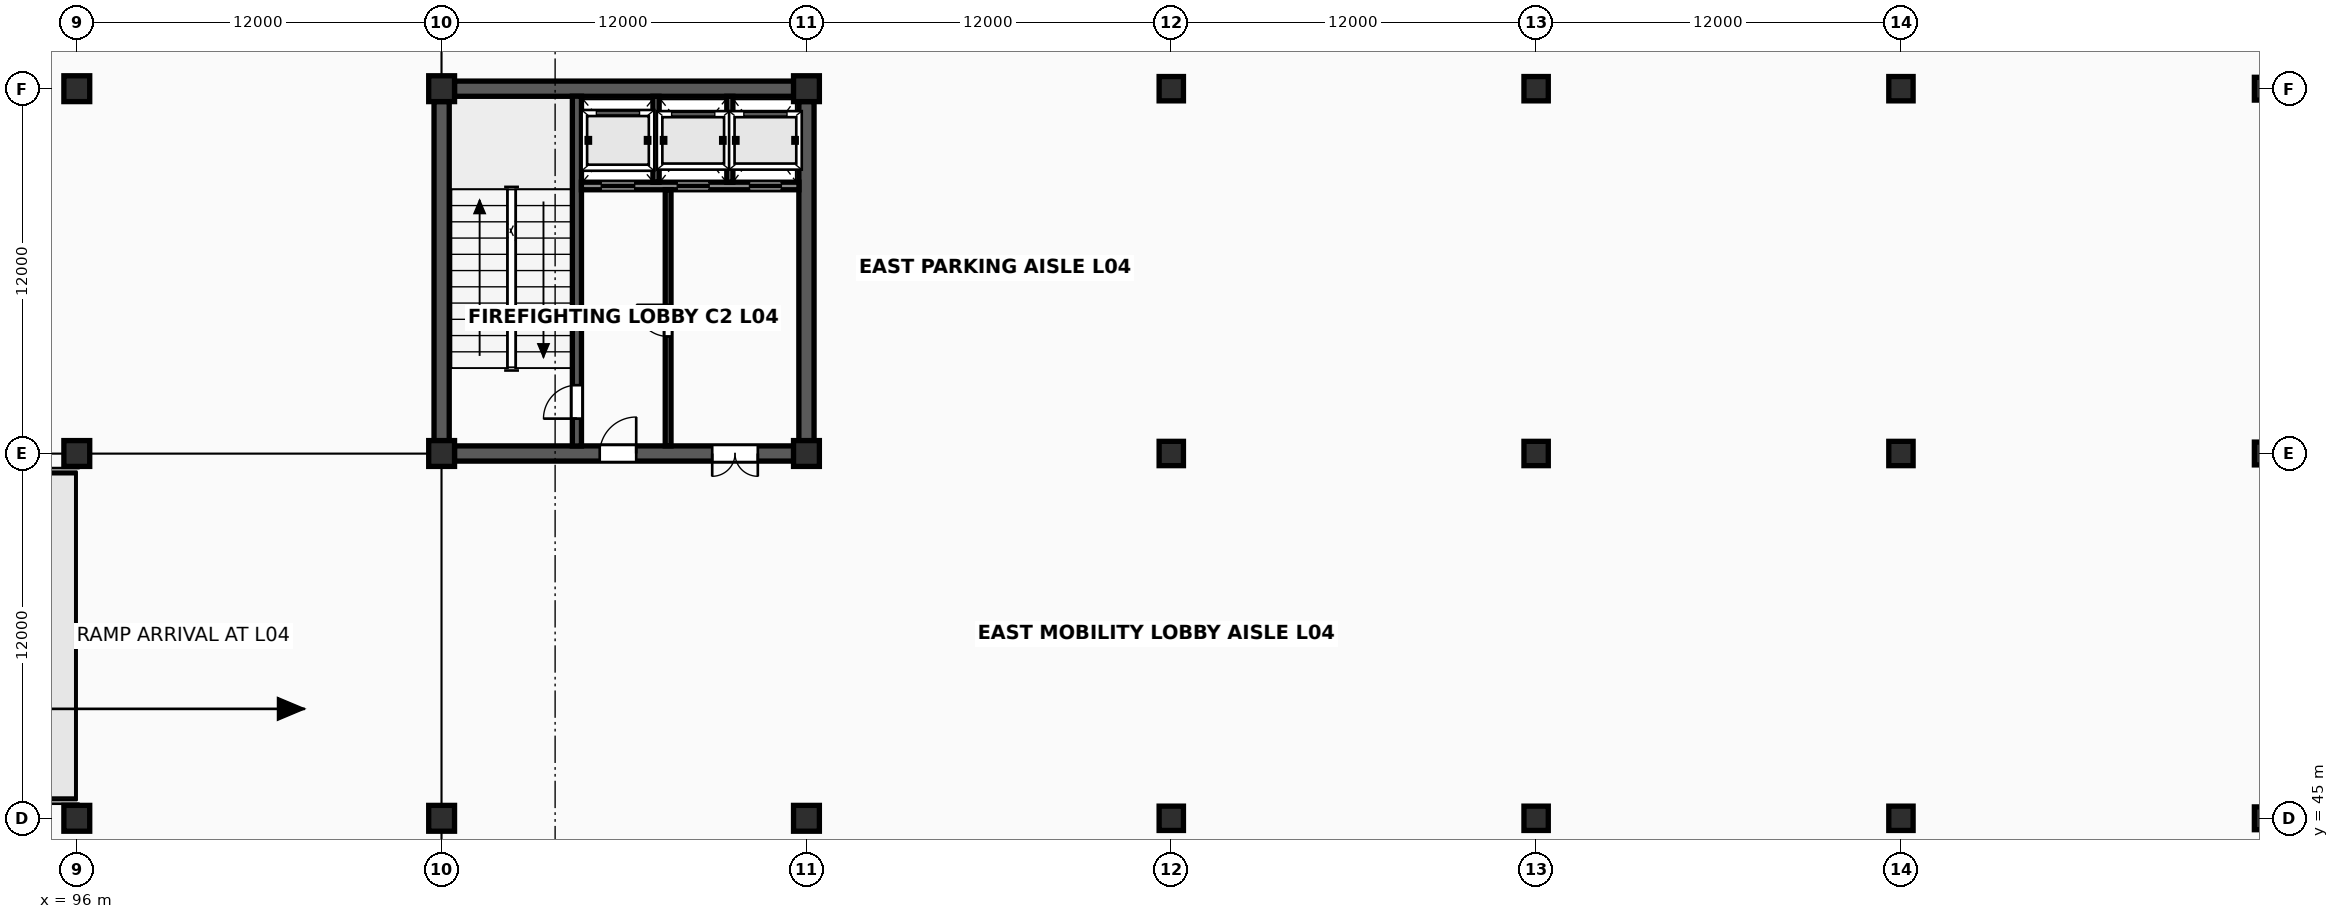
"""IFC4 building model, lengths in metres.
Left out: names, types, materials, properties, quantities, classifications, styles, units other than length and angle.
Written with IfcOpenShell. Run it as: python <this file> out.ifc"""

import sys

from ifc_helpers import new_model, si_unit, direction, frame, frame_2d, origin, origin_2d, place, context, subcontext, project, spatial, rectangle, extrude, element, fill, save


model = new_model("IFC4")
c1 = context("Model", 3, precision=1e-05, world=origin(), true_north=direction((0.0, 1.0)))
c2 = subcontext(c1, "Body", "Model", "MODEL_VIEW")
j1 = project(units=[si_unit("LENGTHUNIT", "METRE"), si_unit("PLANEANGLEUNIT", "RADIAN")], contexts=[c1])
p1 = place(None, origin())
s1 = spatial("IfcSite", under=j1, at=p1, CompositionType="ELEMENT")
p2 = place(p1, origin())
s2 = spatial("IfcBuilding", under=s1, at=p2, CompositionType="ELEMENT")
p3 = place(p2, frame((0.0, 0.0, 17.2)))
s3 = spatial("IfcBuildingStorey", under=s2, at=p3, CompositionType="ELEMENT", Elevation=17.2)
for number, where, z_axis, x_axis in (
    (1, (96.0, 45.0, 0.0), (0.0, 0.0, 1.0), (1.0, 0.0, 0.0)),
    (2, (96.0, 57.0, 0.0), (0.0, 0.0, 1.0), (1.0, 0.0, 0.0)),
    (3, (96.0, 69.0, 0.0), (0.0, 0.0, 1.0), (1.0, 0.0, 0.0)),
    (4, (108.0, 45.0, 0.0), (0.0, 0.0, 1.0), (1.0, 0.0, 0.0)),
    (5, (108.0, 57.0, 0.0), (0.0, 0.0, 1.0), (1.0, 0.0, 0.0)),
    (6, (108.0, 69.0, 0.0), (0.0, 0.0, 1.0), (1.0, 0.0, 0.0)),
    (7, (120.0, 45.0, 0.0), (0.0, 0.0, 1.0), (1.0, 0.0, 0.0)),
    (8, (120.0, 57.0, 0.0), (0.0, 0.0, 1.0), (1.0, 0.0, 0.0)),
    (9, (120.0, 69.0, 0.0), (0.0, 0.0, 1.0), (1.0, 0.0, 0.0)),
):
    element("IfcColumn", number, at=place(p3, frame(where, z_axis=z_axis, x_axis=x_axis)), inside=s3, PredefinedType="COLUMN", context=c2, shape_type="SweptSolid", body=[
        extrude(rectangle(XDim=0.85, YDim=0.85, at=origin_2d()), origin(), (0.0, 0.0, 1.0), 3.8),
    ])
for number, where, z_axis, x_axis in (
    (10, (132.0, 45.0, 0.0), (0.0, 0.0, 1.0), (1.0, 0.0, 0.0)),
    (11, (132.0, 57.0, 0.0), (0.0, 0.0, 1.0), (1.0, 0.0, 0.0)),
    (12, (132.0, 69.0, 0.0), (0.0, 0.0, 1.0), (1.0, 0.0, 0.0)),
    (13, (144.0, 45.0, 0.0), (0.0, 0.0, 1.0), (1.0, 0.0, 0.0)),
    (14, (144.0, 57.0, 0.0), (0.0, 0.0, 1.0), (1.0, 0.0, 0.0)),
    (15, (144.0, 69.0, 0.0), (0.0, 0.0, 1.0), (1.0, 0.0, 0.0)),
    (16, (156.0, 45.0, 0.0), (0.0, 0.0, 1.0), (1.0, 0.0, 0.0)),
    (17, (156.0, 57.0, 0.0), (0.0, 0.0, 1.0), (1.0, 0.0, 0.0)),
    (18, (156.0, 69.0, 0.0), (0.0, 0.0, 1.0), (1.0, 0.0, 0.0)),
):
    element("IfcColumn", number, at=place(p3, frame(where, z_axis=z_axis, x_axis=x_axis)), inside=s3, PredefinedType="COLUMN", context=c2, shape_type="SweptSolid", body=[
        extrude(rectangle(XDim=0.8, YDim=0.8, at=origin_2d()), origin(), (0.0, 0.0, 1.0), 3.8),
    ])
for number, where, z_axis, x_axis in (
    (19, (168.0, 45.0, 0.0), (0.0, 0.0, 1.0), (1.0, 0.0, 0.0)),
    (20, (168.0, 57.0, 0.0), (0.0, 0.0, 1.0), (1.0, 0.0, 0.0)),
    (21, (168.0, 69.0, 0.0), (0.0, 0.0, 1.0), (1.0, 0.0, 0.0)),
):
    element("IfcColumn", number, at=place(p3, frame(where, z_axis=z_axis, x_axis=x_axis)), inside=s3, PredefinedType="COLUMN", context=c2, shape_type="SweptSolid", body=[
        extrude(rectangle(XDim=0.75, YDim=0.75, at=origin_2d()), origin(), (0.0, 0.0, 1.0), 3.8),
    ])
p4 = place(p3, frame((108.422, 57.0, 0.0), z_axis=(0.0, 0.0, 1.0), x_axis=(1.0, 0.0, 0.0)))
e22 = element("IfcWall", 22, at=p4, inside=s3, PredefinedType="SHEAR", context=c2, shape_type="SweptSolid", body=[
    extrude(rectangle(XDim=11.156, YDim=0.5, at=frame_2d((5.578, 0.0))), origin(), (0.0, 0.0, 1.0), 3.643),
])
p5 = place(p4, frame((4.778, 0.0, 0.0)))
e23 = element("IfcOpeningElement", 23, at=p5, cuts=e22, PredefinedType="OPENING", context=c2, shape_type="SweptSolid", body=[
    extrude(rectangle(XDim=1.2, YDim=2.2, at=frame_2d((0.6, 1.1))), frame((0.0, 0.265, 0.0), z_axis=(0.0, -1.0, 0.0), x_axis=(1.0, 0.0, 0.0)), (0.0, 0.0, 1.0), 0.53),
])
p6 = place(p4, frame((8.478, 0.0, 0.0)))
e24 = element("IfcOpeningElement", 24, at=p6, cuts=e22, PredefinedType="OPENING", context=c2, shape_type="SweptSolid", body=[
    extrude(rectangle(XDim=1.5, YDim=2.25, at=frame_2d((0.75, 1.125))), frame((0.0, 0.265, 0.0), z_axis=(0.0, -1.0, 0.0), x_axis=(1.0, 0.0, 0.0)), (0.0, 0.0, 1.0), 0.53),
])
for number, where, z_axis, x_axis in (
    (25, (108.422, 69.0, 0.0), (0.0, 0.0, 1.0), (1.0, 0.0, 0.0)),
    (26, (108.0, 57.422, 0.0), (0.0, 0.0, 1.0), (0.0, 1.0, 0.0)),
    (27, (120.0, 57.422, 0.0), (0.0, 0.0, 1.0), (0.0, 1.0, 0.0)),
):
    element("IfcWall", number, at=place(p3, frame(where, z_axis=z_axis, x_axis=x_axis)), inside=s3, PredefinedType="SHEAR", context=c2, shape_type="SweptSolid", body=[
        extrude(rectangle(XDim=11.156, YDim=0.5, at=frame_2d((5.578, 0.0))), origin(), (0.0, 0.0, 1.0), 3.643),
    ])
p7 = place(p3, frame((112.45, 57.247, 0.0), z_axis=(0.0, 0.0, 1.0), x_axis=(0.0, 1.0, 0.0)))
e28 = element("IfcWall", 28, at=p7, inside=s3, PredefinedType="SHEAR", context=c2, shape_type="SweptSolid", body=[
    extrude(rectangle(XDim=11.506, YDim=0.3, at=frame_2d((5.753, 0.0))), origin(), (0.0, 0.0, 1.0), 3.643),
])
p8 = place(p7, frame((0.9, 0.0, 0.0)))
e29 = element("IfcOpeningElement", 29, at=p8, cuts=e28, PredefinedType="OPENING", context=c2, shape_type="SweptSolid", body=[
    extrude(rectangle(XDim=1.1, YDim=2.2, at=frame_2d((0.55, 1.1))), frame((0.0, 0.165, 0.0), z_axis=(0.0, -1.0, 0.0), x_axis=(1.0, 0.0, 0.0)), (0.0, 0.0, 1.0), 0.33),
])
p9 = place(p3, frame((112.597, 65.8, 0.0), z_axis=(0.0, 0.0, 1.0), x_axis=(1.0, 0.0, 0.0)))
e30 = element("IfcWall", 30, at=p9, inside=s3, PredefinedType="SOLIDWALL", context=c2, shape_type="SweptSolid", body=[
    extrude(rectangle(XDim=7.156, YDim=0.25, at=frame_2d((3.578, 0.0))), origin(), (0.0, 0.0, 1.0), 3.643),
])
p10 = place(p9, frame((0.653, 0.0, 0.0)))
e31 = element("IfcOpeningElement", 31, at=p10, cuts=e30, PredefinedType="OPENING", context=c2, shape_type="SweptSolid", body=[
    extrude(rectangle(XDim=1.1, YDim=2.24, at=frame_2d((0.55, 1.12))), frame((0.0, 0.14, 0.0), z_axis=(0.0, -1.0, 0.0), x_axis=(1.0, 0.0, 0.0)), (0.0, 0.0, 1.0), 0.28),
])
p11 = place(p9, frame((3.153, 0.0, 0.0)))
e32 = element("IfcOpeningElement", 32, at=p11, cuts=e30, PredefinedType="OPENING", context=c2, shape_type="SweptSolid", body=[
    extrude(rectangle(XDim=1.05, YDim=2.2, at=frame_2d((0.525, 1.1))), frame((0.0, 0.14, 0.0), z_axis=(0.0, -1.0, 0.0), x_axis=(1.0, 0.0, 0.0)), (0.0, 0.0, 1.0), 0.28),
])
p12 = place(p9, frame((5.528, 0.0, 0.0)))
e33 = element("IfcOpeningElement", 33, at=p12, cuts=e30, PredefinedType="OPENING", context=c2, shape_type="SweptSolid", body=[
    extrude(rectangle(XDim=1.05, YDim=2.2, at=frame_2d((0.525, 1.1))), frame((0.0, 0.14, 0.0), z_axis=(0.0, -1.0, 0.0), x_axis=(1.0, 0.0, 0.0)), (0.0, 0.0, 1.0), 0.28),
])
for number, where, z_axis, x_axis in (
    (34, (115.05, 65.92, 0.0), (0.0, 0.0, 1.0), (0.0, 1.0, 0.0)),
    (35, (117.48, 65.92, 0.0), (0.0, 0.0, 1.0), (0.0, 1.0, 0.0)),
):
    element("IfcWall", number, at=place(p3, frame(where, z_axis=z_axis, x_axis=x_axis)), inside=s3, PredefinedType="SOLIDWALL", context=c2, shape_type="SweptSolid", body=[
        extrude(rectangle(XDim=2.83, YDim=0.2, at=frame_2d((1.415, 0.0))), origin(), (0.0, 0.0, 1.0), 3.633),
    ])
p13 = place(p3, frame((115.45, 57.25, 0.0), z_axis=(0.0, 0.0, 1.0), x_axis=(0.0, 1.0, 0.0)))
e36 = element("IfcWall", 36, at=p13, inside=s3, PredefinedType="SOLIDWALL", context=c2, shape_type="SweptSolid", body=[
    extrude(rectangle(XDim=8.43, YDim=0.19, at=frame_2d((4.215, 0.0))), origin(), (0.0, 0.0, 1.0), 3.633),
])
p14 = place(p13, frame((3.6, 0.0, 0.0)))
e37 = element("IfcOpeningElement", 37, at=p14, cuts=e36, PredefinedType="OPENING", context=c2, shape_type="SweptSolid", body=[
    extrude(rectangle(XDim=1.04, YDim=2.18, at=frame_2d((0.52, 1.09))), frame((0.0, 0.11, 0.0), z_axis=(0.0, -1.0, 0.0), x_axis=(1.0, 0.0, 0.0)), (0.0, 0.0, 1.0), 0.22),
])
p15 = place(p8, origin())
e38 = element("IfcDoor", 38, at=p15, inside=s3, OperationType="SINGLE_SWING_LEFT", PredefinedType="DOOR", context=c2, shape_type="SweptSolid", body=[
    extrude(rectangle(XDim=1.1, YDim=2.2, at=frame_2d((0.55, 1.1))), frame((0.0, 0.025, 0.0), z_axis=(0.0, -1.0, 0.0), x_axis=(1.0, 0.0, 0.0)), (0.0, 0.0, 1.0), 0.05),
])
fill(e29, e38)
p16 = place(p14, origin())
e39 = element("IfcDoor", 39, at=p16, inside=s3, OperationType="SINGLE_SWING_RIGHT", PredefinedType="DOOR", context=c2, shape_type="SweptSolid", body=[
    extrude(rectangle(XDim=1.04, YDim=2.18, at=frame_2d((0.52, 1.09))), frame((0.0, 0.025, 0.0), z_axis=(0.0, -1.0, 0.0), x_axis=(1.0, 0.0, 0.0)), (0.0, 0.0, 1.0), 0.05),
])
fill(e37, e39)
p17 = place(p5, origin())
e40 = element("IfcDoor", 40, at=p17, inside=s3, OperationType="SINGLE_SWING_RIGHT", PredefinedType="DOOR", context=c2, shape_type="SweptSolid", body=[
    extrude(rectangle(XDim=1.2, YDim=2.2, at=frame_2d((0.6, 1.1))), frame((0.0, 0.025, 0.0), z_axis=(0.0, -1.0, 0.0), x_axis=(1.0, 0.0, 0.0)), (0.0, 0.0, 1.0), 0.05),
])
fill(e23, e40)
p18 = place(p6, origin())
e41 = element("IfcDoor", 41, at=p18, inside=s3, OperationType="DOUBLE_DOOR_SINGLE_SWING", PredefinedType="DOOR", context=c2, shape_type="SweptSolid", body=[
    extrude(rectangle(XDim=1.5, YDim=2.25, at=frame_2d((0.75, 1.125))), frame((0.0, 0.025, 0.0), z_axis=(0.0, -1.0, 0.0), x_axis=(1.0, 0.0, 0.0)), (0.0, 0.0, 1.0), 0.05),
])
fill(e24, e41)
p19 = place(p10, origin())
e42 = element("IfcDoor", 42, at=p19, inside=s3, OperationType="SLIDING_TO_LEFT", PredefinedType="USERDEFINED", context=c2, shape_type="SweptSolid", body=[
    extrude(rectangle(XDim=1.1, YDim=2.24, at=frame_2d((0.55, 1.12))), frame((0.0, 0.025, 0.0), z_axis=(0.0, -1.0, 0.0), x_axis=(1.0, 0.0, 0.0)), (0.0, 0.0, 1.0), 0.05),
])
fill(e31, e42)
p20 = place(p11, origin())
e43 = element("IfcDoor", 43, at=p20, inside=s3, OperationType="SLIDING_TO_LEFT", PredefinedType="USERDEFINED", context=c2, shape_type="SweptSolid", body=[
    extrude(rectangle(XDim=1.05, YDim=2.2, at=frame_2d((0.525, 1.1))), frame((0.0, 0.025, 0.0), z_axis=(0.0, -1.0, 0.0), x_axis=(1.0, 0.0, 0.0)), (0.0, 0.0, 1.0), 0.05),
])
fill(e32, e43)
p21 = place(p12, origin())
e44 = element("IfcDoor", 44, at=p21, inside=s3, OperationType="SLIDING_TO_LEFT", PredefinedType="USERDEFINED", context=c2, shape_type="SweptSolid", body=[
    extrude(rectangle(XDim=1.05, YDim=2.2, at=frame_2d((0.525, 1.1))), frame((0.0, 0.025, 0.0), z_axis=(0.0, -1.0, 0.0), x_axis=(1.0, 0.0, 0.0)), (0.0, 0.0, 1.0), 0.05),
])
fill(e33, e44)
save(model, sys.argv[1])
